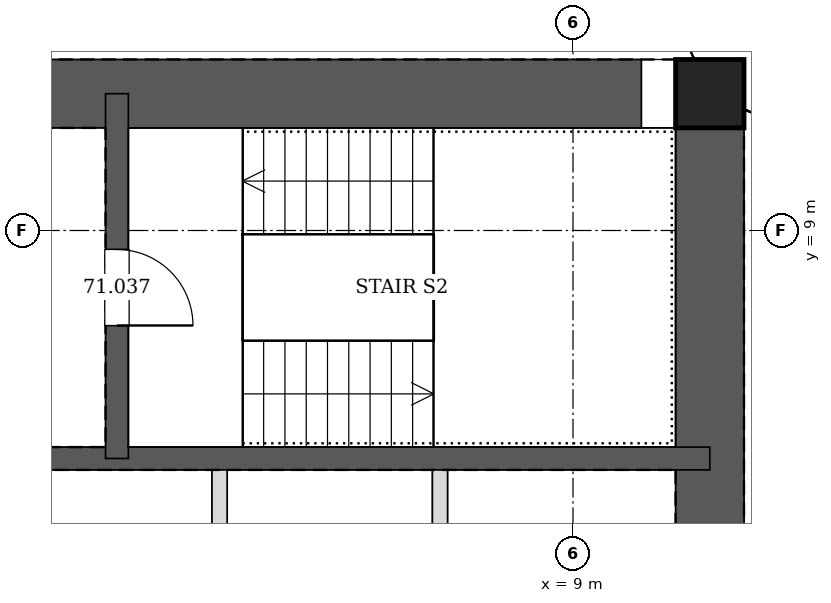
"""IFC4 building model, lengths in metres.
Left out: names, types, materials, properties, quantities, classifications, styles, units other than length and angle.
Written with IfcOpenShell. Run it as: python <this file> out.ifc"""

import sys

from ifc_helpers import new_model, si_unit, direction, frame, frame_2d, origin, origin_2d, place, context, subcontext, project, spatial, rectangle, hollow_rectangle, extrude, element, fill, save


model = new_model("IFC4")
c1 = context("Model", 3, precision=1e-05, world=origin(), true_north=direction((0.0, 1.0)))
c2 = subcontext(c1, "Body", "Model", "MODEL_VIEW")
j1 = project(units=[si_unit("LENGTHUNIT", "METRE"), si_unit("PLANEANGLEUNIT", "RADIAN")], contexts=[c1])
p1 = place(None, origin())
s1 = spatial("IfcSite", under=j1, at=p1, CompositionType="ELEMENT")
p2 = place(p1, origin())
s2 = spatial("IfcBuilding", under=s1, at=p2, CompositionType="ELEMENT")
p3 = place(p2, frame((0.0, 0.0, 291.2)))
s3 = spatial("IfcBuildingStorey", under=s2, at=p3, CompositionType="ELEMENT", Elevation=291.2)
p4 = place(p3, frame((10.8, 10.8, 0.0), z_axis=(0.0, 0.0, 1.0), x_axis=(1.0, 0.0, 0.0)))
e1 = element("IfcColumn", 1, at=p4, inside=s3, PredefinedType="COLUMN", context=c2, shape_type="SweptSolid", body=[
    extrude(hollow_rectangle(XDim=0.9, YDim=0.9, WallThickness=0.04, at=origin_2d()), origin(), (0.0, 0.0, 1.0), 3.4),
])
p5 = place(p3, frame((10.8, -10.8, 0.0), z_axis=(0.0, 0.0, 1.0), x_axis=(0.0, 1.0, 0.0)))
e2 = element("IfcWall", 2, at=p5, inside=s3, PredefinedType="SOLIDWALL", context=c2, shape_type="SweptSolid", body=[
    extrude(rectangle(XDim=21.6, YDim=0.9, at=frame_2d((10.8, 0.0))), origin(), (0.0, 0.0, 1.0), 3.4),
])
p6 = place(p5, frame((11.7, 0.0, 0.0)))
e3 = element("IfcOpeningElement", 3, at=p6, cuts=e2, PredefinedType="OPENING", context=c2, shape_type="SweptSolid", body=[
    extrude(rectangle(XDim=1.2, YDim=2.1, at=frame_2d((0.6, 1.05))), frame((0.0, 0.46, 0.0), z_axis=(0.0, -1.0, 0.0), x_axis=(1.0, 0.0, 0.0)), (0.0, 0.0, 1.0), 0.92),
])
p7 = place(p5, frame((8.7, 0.0, 0.0)))
e4 = element("IfcOpeningElement", 4, at=p7, cuts=e2, PredefinedType="OPENING", context=c2, shape_type="SweptSolid", body=[
    extrude(rectangle(XDim=1.2, YDim=2.1, at=frame_2d((0.6, 1.05))), frame((0.0, 0.46, 0.0), z_axis=(0.0, -1.0, 0.0), x_axis=(1.0, 0.0, 0.0)), (0.0, 0.0, 1.0), 0.92),
])
p8 = place(p3, frame((10.8, 10.8, 0.0), z_axis=(0.0, 0.0, 1.0), x_axis=(-1.0, 0.0, 0.0)))
e5 = element("IfcWall", 5, at=p8, inside=s3, PredefinedType="SOLIDWALL", context=c2, shape_type="SweptSolid", body=[
    extrude(rectangle(XDim=21.6, YDim=0.9, at=frame_2d((10.8, 0.0))), origin(), (0.0, 0.0, 1.0), 3.4),
])
p9 = place(p8, frame((10.05, 0.0, 0.0)))
e6 = element("IfcOpeningElement", 6, at=p9, cuts=e5, PredefinedType="OPENING", context=c2, shape_type="SweptSolid", body=[
    extrude(rectangle(XDim=1.5, YDim=2.1, at=frame_2d((0.75, 1.05))), frame((0.0, 0.46, 0.0), z_axis=(0.0, -1.0, 0.0), x_axis=(1.0, 0.0, 0.0)), (0.0, 0.0, 1.0), 0.92),
])
p10 = place(p3, frame((-10.8, 6.0, 0.0), z_axis=(0.0, 0.0, 1.0), x_axis=(1.0, 0.0, 0.0)))
e7 = element("IfcWall", 7, at=p10, inside=s3, PredefinedType="SOLIDWALL", context=c2, shape_type="SweptSolid", body=[
    extrude(rectangle(XDim=21.6, YDim=0.3, at=frame_2d((10.8, 0.0))), origin(), (0.0, 0.0, 1.0), 3.4),
])
p11 = place(p10, frame((10.25, 0.0, 0.0)))
e8 = element("IfcOpeningElement", 8, at=p11, cuts=e7, PredefinedType="OPENING", context=c2, shape_type="SweptSolid", body=[
    extrude(rectangle(XDim=1.1, YDim=2.1, at=frame_2d((0.55, 1.05))), frame((0.0, 0.16, 0.0), z_axis=(0.0, -1.0, 0.0), x_axis=(1.0, 0.0, 0.0)), (0.0, 0.0, 1.0), 0.32),
])
p12 = place(p3, frame((3.0, 6.0, 0.0), z_axis=(0.0, 0.0, 1.0), x_axis=(0.0, 1.0, 0.0)))
e9 = element("IfcWall", 9, at=p12, inside=s3, PredefinedType="SOLIDWALL", context=c2, shape_type="SweptSolid", body=[
    extrude(rectangle(XDim=4.8, YDim=0.3, at=frame_2d((2.4, 0.0))), origin(), (0.0, 0.0, 1.0), 3.4),
])
p13 = place(p12, frame((1.75, 0.0, 0.0)))
e10 = element("IfcOpeningElement", 10, at=p13, cuts=e9, PredefinedType="OPENING", context=c2, shape_type="SweptSolid", body=[
    extrude(rectangle(XDim=1.0, YDim=2.1, at=frame_2d((0.5, 1.05))), frame((0.0, 0.16, 0.0), z_axis=(0.0, -1.0, 0.0), x_axis=(1.0, 0.0, 0.0)), (0.0, 0.0, 1.0), 0.32),
])
for number, where, z_axis, x_axis in (
    (11, (4.35, 3.15, 0.0), (0.0, 0.0, 1.0), (0.0, 1.0, 0.0)),
    (12, (7.25, 3.15, 0.0), (0.0, 0.0, 1.0), (0.0, 1.0, 0.0)),
):
    element("IfcWall", number, at=place(p3, frame(where, z_axis=z_axis, x_axis=x_axis)), inside=s3, PredefinedType="PARTITIONING", context=c2, shape_type="SweptSolid", body=[
        extrude(rectangle(XDim=2.7, YDim=0.2, at=frame_2d((1.35, 0.0))), origin(), (0.0, 0.0, 1.0), 3.2),
    ])
p14 = place(p13, frame((1.0, 0.0, 0.0), z_axis=(0.0, 0.0, 1.0), x_axis=(-1.0, 0.0, 0.0)))
e13 = element("IfcDoor", 13, at=p14, inside=s3, OperationType="SINGLE_SWING_RIGHT", PredefinedType="DOOR", context=c2, shape_type="SweptSolid", body=[
    extrude(rectangle(XDim=1.0, YDim=2.1, at=frame_2d((0.5, 1.05))), frame((0.0, 0.025, 0.0), z_axis=(0.0, -1.0, 0.0), x_axis=(1.0, 0.0, 0.0)), (0.0, 0.0, 1.0), 0.05),
])
fill(e10, e13)
save(model, sys.argv[1])
